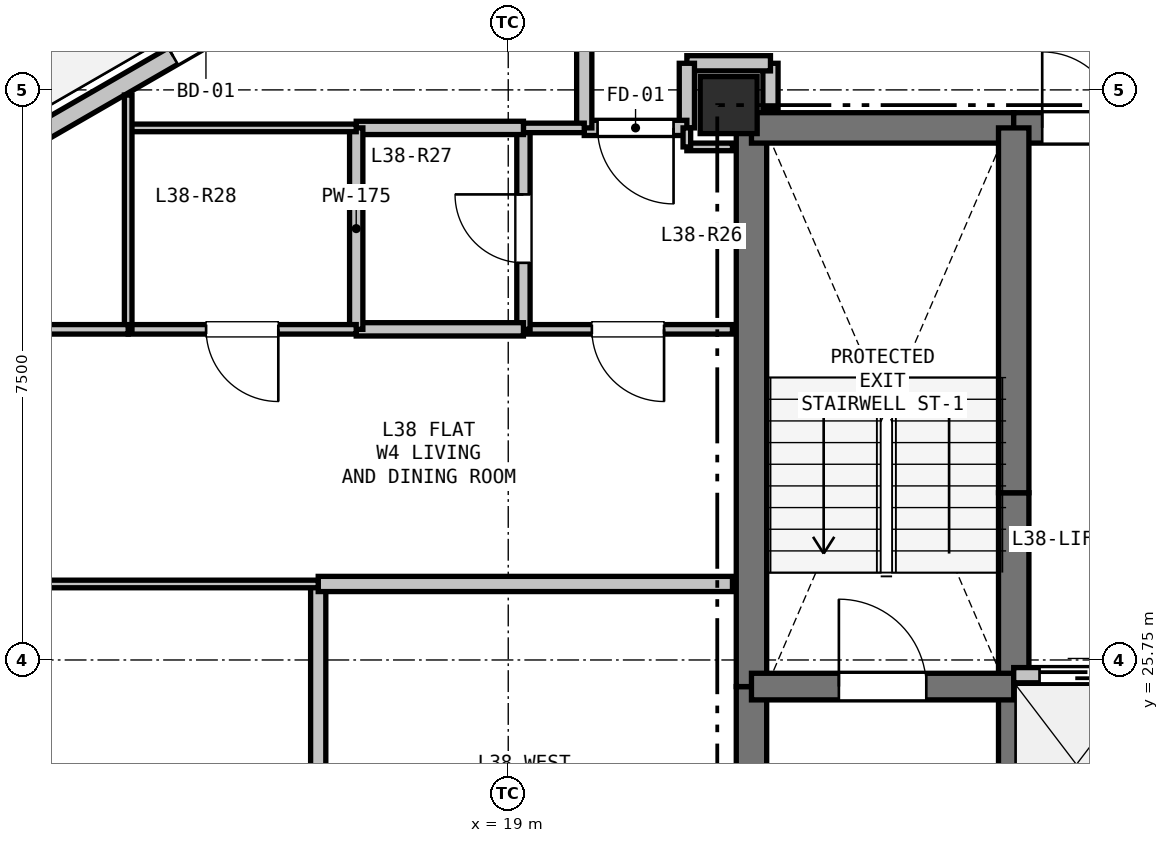
"""IFC4 building model, lengths in metres.
Left out: names, types, materials, properties, quantities, classifications, styles, units other than length and angle.
Written with IfcOpenShell. Run it as: python <this file> out.ifc"""

import sys

from ifc_helpers import new_model, si_unit, direction, frame, frame_2d, origin, origin_2d, place, context, subcontext, project, spatial, rectangle, extrude, element, fill, save


model = new_model("IFC4")
c1 = context("Model", 3, precision=1e-05, world=origin(), true_north=direction((0.0, 1.0)))
c2 = subcontext(c1, "Body", "Model", "MODEL_VIEW")
j1 = project(units=[si_unit("LENGTHUNIT", "METRE"), si_unit("PLANEANGLEUNIT", "RADIAN")], contexts=[c1])
p1 = place(None, origin())
s1 = spatial("IfcSite", under=j1, at=p1, CompositionType="ELEMENT")
p2 = place(p1, origin())
s2 = spatial("IfcBuilding", under=s1, at=p2, CompositionType="ELEMENT")
p3 = place(p2, frame((0.0, 0.0, 137.7)))
s3 = spatial("IfcBuildingStorey", under=s2, at=p3, CompositionType="ELEMENT", Elevation=137.7)
p4 = place(p3, frame((21.9, 33.05, 0.0), z_axis=(0.0, 0.0, 1.0), x_axis=(1.0, 0.0, 0.0)))
e1 = element("IfcColumn", 1, at=p4, inside=s3, PredefinedType="COLUMN", context=c2, shape_type="SweptSolid", body=[
    extrude(rectangle(XDim=0.75, YDim=0.75, at=origin_2d()), origin(), (0.0, 0.0, 1.0), 3.3),
])
p5 = place(p3, frame((6.69, 29.134, 0.0), z_axis=(0.0, 0.0, 1.0), x_axis=(0.866027848477, 0.499995765644, 0.0)))
e2 = element("IfcWall", 2, at=p5, inside=s3, PredefinedType="SOLIDWALL", context=c2, shape_type="SweptSolid", body=[
    extrude(rectangle(XDim=11.186, YDim=0.25, at=frame_2d((5.593, 0.0))), origin(), (0.0, 0.0, 1.0), 2.68),
])
p6 = place(p5, frame((9.122, 0.0, 0.0)))
e3 = element("IfcOpeningElement", 3, at=p6, cuts=e2, PredefinedType="OPENING", context=c2, shape_type="SweptSolid", body=[
    extrude(rectangle(XDim=1.0, YDim=2.1, at=frame_2d((0.5, 1.05))), frame((0.0, 0.135, 0.0), z_axis=(0.0, -1.0, 0.0), x_axis=(1.0, 0.0, 0.0)), (0.0, 0.0, 1.0), 0.27),
])
p7 = place(p3, frame((16.378, 18.773, 0.0), z_axis=(0.0, 0.0, 1.0), x_axis=(-0.866027848477, 0.499995765644, 0.0)))
e4 = element("IfcWall", 4, at=p7, inside=s3, PredefinedType="SOLIDWALL", context=c2, shape_type="SweptSolid", body=[
    extrude(rectangle(XDim=11.186, YDim=0.25, at=frame_2d((5.593, 0.0))), origin(), (0.0, 0.0, 1.0), 2.68),
])
p8 = place(p7, frame((6.605, 0.0, 0.9)))
e5 = element("IfcOpeningElement", 5, at=p8, cuts=e4, PredefinedType="OPENING", context=c2, shape_type="SweptSolid", body=[
    extrude(rectangle(XDim=1.2, YDim=1.4, at=frame_2d((0.6, 0.7))), frame((0.0, 0.135, 0.0), z_axis=(0.0, -1.0, 0.0), x_axis=(1.0, 0.0, 0.0)), (0.0, 0.0, 1.0), 0.27),
])
p9 = place(p3, frame((22.2, 20.75, 0.0), z_axis=(0.0, 0.0, 1.0), x_axis=(0.0, 1.0, 0.0)))
e6 = element("IfcWall", 6, at=p9, inside=s3, PredefinedType="SHEAR", context=c2, shape_type="SweptSolid", body=[
    extrude(rectangle(XDim=4.65, YDim=0.4, at=frame_2d((2.325, 0.0))), origin(), (0.0, 0.0, 1.0), 3.06),
])
p10 = place(p3, frame((22.2, 25.4, 0.0), z_axis=(0.0, 0.0, 1.0), x_axis=(0.0, 1.0, 0.0)))
e7 = element("IfcWall", 7, at=p10, inside=s3, PredefinedType="SHEAR", context=c2, shape_type="SweptSolid", body=[
    extrude(rectangle(XDim=7.35, YDim=0.4, at=frame_2d((3.675, 0.0))), origin(), (0.0, 0.0, 1.0), 3.06),
])
p11 = place(p3, frame((22.2, 32.75, 0.0), z_axis=(0.0, 0.0, 1.0), x_axis=(1.0, 0.0, 0.0)))
e8 = element("IfcWall", 8, at=p11, inside=s3, PredefinedType="SHEAR", context=c2, shape_type="SweptSolid", body=[
    extrude(rectangle(XDim=3.45, YDim=0.4, at=frame_2d((1.725, 0.0))), origin(), (0.0, 0.0, 1.0), 3.06),
])
p12 = place(p3, frame((25.65, 32.75, 0.0), z_axis=(0.0, 0.0, 1.0), x_axis=(1.0, 0.0, 0.0)))
e9 = element("IfcWall", 9, at=p12, inside=s3, PredefinedType="SHEAR", context=c2, shape_type="SweptSolid", body=[
    extrude(rectangle(XDim=1.75, YDim=0.4, at=frame_2d((0.875, 0.0))), origin(), (0.0, 0.0, 1.0), 3.06),
])
p13 = place(p12, frame((0.375, 0.0, 0.0)))
e10 = element("IfcOpeningElement", 10, at=p13, cuts=e9, PredefinedType="OPENING", context=c2, shape_type="SweptSolid", body=[
    extrude(rectangle(XDim=1.0, YDim=2.15, at=frame_2d((0.5, 1.075))), frame((0.0, 0.21, 0.0), z_axis=(0.0, -1.0, 0.0), x_axis=(1.0, 0.0, 0.0)), (0.0, 0.0, 1.0), 0.42),
])
p14 = place(p3, frame((25.65, 22.75, 0.0), z_axis=(0.0, 0.0, 1.0), x_axis=(0.0, 1.0, 0.0)))
e11 = element("IfcWall", 11, at=p14, inside=s3, PredefinedType="SHEAR", context=c2, shape_type="SweptSolid", body=[
    extrude(rectangle(XDim=2.8, YDim=0.4, at=frame_2d((1.4, 0.0))), origin(), (0.0, 0.0, 1.0), 3.06),
])
p15 = place(p3, frame((25.65, 25.55, 0.0), z_axis=(0.0, 0.0, 1.0), x_axis=(0.0, 1.0, 0.0)))
e12 = element("IfcWall", 12, at=p15, inside=s3, PredefinedType="SHEAR", context=c2, shape_type="SweptSolid", body=[
    extrude(rectangle(XDim=2.4, YDim=0.4, at=frame_2d((1.2, 0.0))), origin(), (0.0, 0.0, 1.0), 3.06),
])
p16 = place(p3, frame((25.65, 27.95, 0.0), z_axis=(0.0, 0.0, 1.0), x_axis=(0.0, 1.0, 0.0)))
e13 = element("IfcWall", 13, at=p16, inside=s3, PredefinedType="SHEAR", context=c2, shape_type="SweptSolid", body=[
    extrude(rectangle(XDim=4.8, YDim=0.4, at=frame_2d((2.4, 0.0))), origin(), (0.0, 0.0, 1.0), 3.06),
])
p17 = place(p3, frame((22.2, 25.4, 0.0), z_axis=(0.0, 0.0, 1.0), x_axis=(1.0, 0.0, 0.0)))
e14 = element("IfcWall", 14, at=p17, inside=s3, PredefinedType="SHEAR", context=c2, shape_type="SweptSolid", body=[
    extrude(rectangle(XDim=3.45, YDim=0.35, at=frame_2d((1.725, 0.0))), origin(), (0.0, 0.0, 1.0), 3.06),
])
p18 = place(p17, frame((1.15, 0.0, 0.0)))
e15 = element("IfcOpeningElement", 15, at=p18, cuts=e14, PredefinedType="OPENING", context=c2, shape_type="SweptSolid", body=[
    extrude(rectangle(XDim=1.15, YDim=2.15, at=frame_2d((0.575, 1.075))), frame((0.0, 0.185, 0.0), z_axis=(0.0, -1.0, 0.0), x_axis=(1.0, 0.0, 0.0)), (0.0, 0.0, 1.0), 0.37),
])
p19 = place(p3, frame((25.65, 25.55, 0.0), z_axis=(0.0, 0.0, 1.0), x_axis=(1.0, 0.0, 0.0)))
e16 = element("IfcWall", 16, at=p19, inside=s3, PredefinedType="PARTITIONING", context=c2, shape_type="SweptSolid", body=[
    extrude(rectangle(XDim=4.95, YDim=0.2, at=frame_2d((2.475, 0.0))), origin(), (0.0, 0.0, 1.0), 3.06),
])
p20 = place(p19, frame((0.34, 0.0, 0.0)))
e17 = element("IfcOpeningElement", 17, at=p20, cuts=e16, PredefinedType="OPENING", context=c2, shape_type="SweptSolid", body=[
    extrude(rectangle(XDim=1.1, YDim=2.15, at=frame_2d((0.55, 1.075))), frame((0.0, 0.11, 0.0), z_axis=(0.0, -1.0, 0.0), x_axis=(1.0, 0.0, 0.0)), (0.0, 0.0, 1.0), 0.22),
])
p21 = place(p19, frame((1.99, 0.0, 0.0)))
e18 = element("IfcOpeningElement", 18, at=p21, cuts=e16, PredefinedType="OPENING", context=c2, shape_type="SweptSolid", body=[
    extrude(rectangle(XDim=1.1, YDim=2.15, at=frame_2d((0.55, 1.075))), frame((0.0, 0.11, 0.0), z_axis=(0.0, -1.0, 0.0), x_axis=(1.0, 0.0, 0.0)), (0.0, 0.0, 1.0), 0.22),
])
p22 = place(p19, frame((3.64, 0.0, 0.0)))
e19 = element("IfcOpeningElement", 19, at=p22, cuts=e16, PredefinedType="OPENING", context=c2, shape_type="SweptSolid", body=[
    extrude(rectangle(XDim=1.1, YDim=2.15, at=frame_2d((0.55, 1.075))), frame((0.0, 0.11, 0.0), z_axis=(0.0, -1.0, 0.0), x_axis=(1.0, 0.0, 0.0)), (0.0, 0.0, 1.0), 0.22),
])
p23 = place(p3, frame((22.45, 33.0, 0.0), z_axis=(0.0, 0.0, 1.0), x_axis=(0.0, 1.0, 0.0)))
e20 = element("IfcWall", 20, at=p23, inside=s3, PredefinedType="PARTITIONING", context=c2, shape_type="SweptSolid", body=[
    extrude(rectangle(XDim=0.6, YDim=0.2, at=frame_2d((0.3, 0.0))), origin(), (0.0, 0.0, 1.0), 2.508),
])
p24 = place(p3, frame((22.45, 33.6, 0.0), z_axis=(0.0, 0.0, 1.0), x_axis=(-1.0, 0.0, 0.0)))
e21 = element("IfcWall", 21, at=p24, inside=s3, PredefinedType="PARTITIONING", context=c2, shape_type="SweptSolid", body=[
    extrude(rectangle(XDim=1.1, YDim=0.2, at=frame_2d((0.55, 0.0))), origin(), (0.0, 0.0, 1.0), 3.06),
])
p25 = place(p3, frame((21.35, 33.6, 0.0), z_axis=(0.0, 0.0, 1.0), x_axis=(0.0, -1.0, 0.0)))
e22 = element("IfcWall", 22, at=p25, inside=s3, PredefinedType="PARTITIONING", context=c2, shape_type="SweptSolid", body=[
    extrude(rectangle(XDim=0.85, YDim=0.2, at=frame_2d((0.425, 0.0))), origin(), (0.0, 0.0, 1.0), 2.433),
])
p26 = place(p3, frame((21.35, 32.75, 0.0), z_axis=(0.0, 0.0, 1.0), x_axis=(-1.0, 0.0, 0.0)))
e23 = element("IfcWall", 23, at=p26, inside=s3, PredefinedType="PARTITIONING", context=c2, shape_type="SweptSolid", body=[
    extrude(rectangle(XDim=1.35, YDim=0.2, at=frame_2d((0.675, 0.0))), origin(), (0.0, 0.0, 1.0), 2.433),
])
p27 = place(p26, frame((0.175, 0.0, 0.0)))
e24 = element("IfcOpeningElement", 24, at=p27, cuts=e23, PredefinedType="OPENING", context=c2, shape_type="SweptSolid", body=[
    extrude(rectangle(XDim=1.0, YDim=2.15, at=frame_2d((0.5, 1.075))), frame((0.0, 0.11, 0.0), z_axis=(0.0, -1.0, 0.0), x_axis=(1.0, 0.0, 0.0)), (0.0, 0.0, 1.0), 0.22),
])
p28 = place(p3, frame((20.0, 32.75, 0.0), z_axis=(0.0, 0.0, 1.0), x_axis=(0.0, 1.0, 0.0)))
e25 = element("IfcWall", 25, at=p28, inside=s3, PredefinedType="PARTITIONING", context=c2, shape_type="SweptSolid", body=[
    extrude(rectangle(XDim=2.6, YDim=0.2, at=frame_2d((1.3, 0.0))), origin(), (0.0, 0.0, 1.0), 2.433),
])
p29 = place(p3, frame((21.35, 32.5, 0.0), z_axis=(0.0, 0.0, 1.0), x_axis=(1.0, 0.0, 0.0)))
e26 = element("IfcWall", 26, at=p29, inside=s3, PredefinedType="PARTITIONING", context=c2, shape_type="SweptSolid", body=[
    extrude(rectangle(XDim=0.6, YDim=0.1, at=frame_2d((0.3, 0.0))), origin(), (0.0, 0.0, 1.0), 2.508),
])
p30 = place(p3, frame((21.95, 30.1, 0.0), z_axis=(0.0, 0.0, 1.0), x_axis=(-1.0, 0.0, 0.0)))
e27 = element("IfcWall", 27, at=p30, inside=s3, PredefinedType="PARTITIONING", context=c2, shape_type="SweptSolid", body=[
    extrude(rectangle(XDim=2.75, YDim=0.125, at=frame_2d((1.375, 0.0))), origin(), (0.0, 0.0, 1.0), 2.508),
])
p31 = place(p30, frame((0.9, 0.0, 0.0)))
e28 = element("IfcOpeningElement", 28, at=p31, cuts=e27, PredefinedType="OPENING", context=c2, shape_type="SweptSolid", body=[
    extrude(rectangle(XDim=0.95, YDim=2.1, at=frame_2d((0.475, 1.05))), frame((0.0, 0.073, 0.0), z_axis=(0.0, -1.0, 0.0), x_axis=(1.0, 0.0, 0.0)), (0.0, 0.0, 1.0), 0.145),
])
p32 = place(p3, frame((19.2, 30.1, 0.0), z_axis=(0.0, 0.0, 1.0), x_axis=(0.0, 1.0, 0.0)))
e29 = element("IfcWall", 29, at=p32, inside=s3, PredefinedType="PLUMBINGWALL", context=c2, shape_type="SweptSolid", body=[
    extrude(rectangle(XDim=2.65, YDim=0.175, at=frame_2d((1.325, 0.0))), origin(), (0.0, 0.0, 1.0), 2.433),
])
p33 = place(p32, frame((0.875, 0.0, 0.0)))
e30 = element("IfcOpeningElement", 30, at=p33, cuts=e29, PredefinedType="OPENING", context=c2, shape_type="SweptSolid", body=[
    extrude(rectangle(XDim=0.9, YDim=2.1, at=frame_2d((0.45, 1.05))), frame((0.0, 0.097, 0.0), z_axis=(0.0, -1.0, 0.0), x_axis=(1.0, 0.0, 0.0)), (0.0, 0.0, 1.0), 0.195),
])
p34 = place(p3, frame((19.2, 32.75, 0.0), z_axis=(0.0, 0.0, 1.0), x_axis=(1.0, 0.0, 0.0)))
e31 = element("IfcWall", 31, at=p34, inside=s3, PredefinedType="PARTITIONING", context=c2, shape_type="SweptSolid", body=[
    extrude(rectangle(XDim=0.8, YDim=0.125, at=frame_2d((0.4, 0.0))), origin(), (0.0, 0.0, 1.0), 2.433),
])
p35 = place(p3, frame((21.35, 32.75, 0.0), z_axis=(0.0, 0.0, 1.0), x_axis=(0.0, -1.0, 0.0)))
e32 = element("IfcWall", 32, at=p35, inside=s3, PredefinedType="PARTITIONING", context=c2, shape_type="SweptSolid", body=[
    extrude(rectangle(XDim=0.25, YDim=0.1, at=frame_2d((0.125, 0.0))), origin(), (0.0, 0.0, 1.0), 3.06),
])
p36 = place(p3, frame((17.0, 32.75, 0.0), z_axis=(0.0, 0.0, 1.0), x_axis=(1.0, 0.0, 0.0)))
e33 = element("IfcWall", 33, at=p36, inside=s3, PredefinedType="PLUMBINGWALL", context=c2, shape_type="SweptSolid", body=[
    extrude(rectangle(XDim=2.2, YDim=0.175, at=frame_2d((1.1, 0.0))), origin(), (0.0, 0.0, 1.0), 2.433),
])
p37 = place(p3, frame((19.2, 30.1, 0.0), z_axis=(0.0, 0.0, 1.0), x_axis=(-1.0, 0.0, 0.0)))
e34 = element("IfcWall", 34, at=p37, inside=s3, PredefinedType="PLUMBINGWALL", context=c2, shape_type="SweptSolid", body=[
    extrude(rectangle(XDim=2.2, YDim=0.175, at=frame_2d((1.1, 0.0))), origin(), (0.0, 0.0, 1.0), 3.06),
])
p38 = place(p3, frame((17.0, 30.1, 0.0), z_axis=(0.0, 0.0, 1.0), x_axis=(0.0, 1.0, 0.0)))
e35 = element("IfcWall", 35, at=p38, inside=s3, PredefinedType="PLUMBINGWALL", context=c2, shape_type="SweptSolid", body=[
    extrude(rectangle(XDim=2.65, YDim=0.175, at=frame_2d((1.325, 0.0))), origin(), (0.0, 0.0, 1.0), 2.433),
])
p39 = place(p3, frame((14.0, 32.75, 0.0), z_axis=(0.0, 0.0, 1.0), x_axis=(1.0, 0.0, 0.0)))
e36 = element("IfcWall", 36, at=p39, inside=s3, PredefinedType="PARTITIONING", context=c2, shape_type="SweptSolid", body=[
    extrude(rectangle(XDim=3.0, YDim=0.1, at=frame_2d((1.5, 0.0))), origin(), (0.0, 0.0, 1.0), 2.365),
])
p40 = place(p3, frame((17.0, 30.1, 0.0), z_axis=(0.0, 0.0, 1.0), x_axis=(-1.0, 0.0, 0.0)))
e37 = element("IfcWall", 37, at=p40, inside=s3, PredefinedType="PARTITIONING", context=c2, shape_type="SweptSolid", body=[
    extrude(rectangle(XDim=3.0, YDim=0.125, at=frame_2d((1.5, 0.0))), origin(), (0.0, 0.0, 1.0), 3.06),
])
p41 = place(p40, frame((1.025, 0.0, 0.0)))
e38 = element("IfcOpeningElement", 38, at=p41, cuts=e37, PredefinedType="OPENING", context=c2, shape_type="SweptSolid", body=[
    extrude(rectangle(XDim=0.95, YDim=2.1, at=frame_2d((0.475, 1.05))), frame((0.0, 0.073, 0.0), z_axis=(0.0, -1.0, 0.0), x_axis=(1.0, 0.0, 0.0)), (0.0, 0.0, 1.0), 0.145),
])
p42 = place(p3, frame((14.0, 30.1, 0.0), z_axis=(0.0, 0.0, 1.0), x_axis=(0.0, 1.0, 0.0)))
e39 = element("IfcWall", 39, at=p42, inside=s3, PredefinedType="PARTITIONING", context=c2, shape_type="SweptSolid", body=[
    extrude(rectangle(XDim=3.082, YDim=0.1, at=frame_2d((1.541, 0.0))), origin(), (0.0, 0.0, 1.0), 2.365),
])
p43 = place(p3, frame((16.5, 20.75, 0.0), z_axis=(0.0, 0.0, 1.0), x_axis=(0.0, 1.0, 0.0)))
e40 = element("IfcWall", 40, at=p43, inside=s3, PredefinedType="PARTITIONING", context=c2, shape_type="SweptSolid", body=[
    extrude(rectangle(XDim=6.0, YDim=0.2, at=frame_2d((3.0, 0.0))), origin(), (0.0, 0.0, 1.0), 2.433),
])
p44 = place(p3, frame((16.5, 26.75, 0.0), z_axis=(0.0, 0.0, 1.0), x_axis=(1.0, 0.0, 0.0)))
e41 = element("IfcWall", 41, at=p44, inside=s3, PredefinedType="PARTITIONING", context=c2, shape_type="SweptSolid", body=[
    extrude(rectangle(XDim=5.45, YDim=0.2, at=frame_2d((2.725, 0.0))), origin(), (0.0, 0.0, 1.0), 2.508),
])
p45 = place(p3, frame((8.635, 30.1, 0.0), z_axis=(0.0, 0.0, 1.0), x_axis=(1.0, 0.0, 0.0)))
e42 = element("IfcWall", 42, at=p45, inside=s3, PredefinedType="PARTITIONING", context=c2, shape_type="SweptSolid", body=[
    extrude(rectangle(XDim=5.365, YDim=0.125, at=frame_2d((2.683, 0.0))), origin(), (0.0, 0.0, 1.0), 2.725),
])
p46 = place(p3, frame((16.5, 26.75, 0.0), z_axis=(0.0, 0.0, 1.0), x_axis=(-1.0, 0.0, 0.0)))
e43 = element("IfcWall", 43, at=p46, inside=s3, PredefinedType="PARTITIONING", context=c2, shape_type="SweptSolid", body=[
    extrude(rectangle(XDim=9.791, YDim=0.1, at=frame_2d((4.896, 0.0))), origin(), (0.0, 0.0, 1.0), 2.725),
])
p47 = place(p46, frame((4.42, 0.0, 0.0)))
e44 = element("IfcOpeningElement", 44, at=p47, cuts=e43, PredefinedType="OPENING", context=c2, shape_type="SweptSolid", body=[
    extrude(rectangle(XDim=0.95, YDim=2.1, at=frame_2d((0.475, 1.05))), frame((0.0, 0.06, 0.0), z_axis=(0.0, -1.0, 0.0), x_axis=(1.0, 0.0, 0.0)), (0.0, 0.0, 1.0), 0.12),
])
p48 = place(p6, origin())
e45 = element("IfcDoor", 45, at=p48, inside=s3, OperationType="SINGLE_SWING_LEFT", PredefinedType="DOOR", context=c2, shape_type="SweptSolid", body=[
    extrude(rectangle(XDim=1.0, YDim=2.1, at=frame_2d((0.5, 1.05))), frame((0.0, 0.025, 0.0), z_axis=(0.0, -1.0, 0.0), x_axis=(1.0, 0.0, 0.0)), (0.0, 0.0, 1.0), 0.05),
])
fill(e3, e45)
p49 = place(p20, origin())
e46 = element("IfcDoor", 46, at=p49, inside=s3, OperationType="SLIDING_TO_LEFT", PredefinedType="DOOR", context=c2, shape_type="SweptSolid", body=[
    extrude(rectangle(XDim=1.1, YDim=2.15, at=frame_2d((0.55, 1.075))), frame((0.0, 0.025, 0.0), z_axis=(0.0, -1.0, 0.0), x_axis=(1.0, 0.0, 0.0)), (0.0, 0.0, 1.0), 0.05),
])
fill(e17, e46)
p50 = place(p13, origin())
e47 = element("IfcDoor", 47, at=p50, inside=s3, OperationType="SINGLE_SWING_LEFT", PredefinedType="DOOR", context=c2, shape_type="SweptSolid", body=[
    extrude(rectangle(XDim=1.0, YDim=2.15, at=frame_2d((0.5, 1.075))), frame((0.0, 0.025, 0.0), z_axis=(0.0, -1.0, 0.0), x_axis=(1.0, 0.0, 0.0)), (0.0, 0.0, 1.0), 0.05),
])
fill(e10, e47)
p51 = place(p18, origin())
e48 = element("IfcDoor", 48, at=p51, inside=s3, OperationType="SINGLE_SWING_LEFT", PredefinedType="DOOR", context=c2, shape_type="SweptSolid", body=[
    extrude(rectangle(XDim=1.15, YDim=2.15, at=frame_2d((0.575, 1.075))), frame((0.0, 0.025, 0.0), z_axis=(0.0, -1.0, 0.0), x_axis=(1.0, 0.0, 0.0)), (0.0, 0.0, 1.0), 0.05),
])
fill(e15, e48)
p52 = place(p27, origin())
e49 = element("IfcDoor", 49, at=p52, inside=s3, OperationType="SINGLE_SWING_LEFT", PredefinedType="DOOR", context=c2, shape_type="SweptSolid", body=[
    extrude(rectangle(XDim=1.0, YDim=2.15, at=frame_2d((0.5, 1.075))), frame((0.0, 0.025, 0.0), z_axis=(0.0, -1.0, 0.0), x_axis=(1.0, 0.0, 0.0)), (0.0, 0.0, 1.0), 0.05),
])
fill(e24, e49)
p53 = place(p33, origin())
e50 = element("IfcDoor", 50, at=p53, inside=s3, OperationType="SINGLE_SWING_RIGHT", PredefinedType="DOOR", context=c2, shape_type="SweptSolid", body=[
    extrude(rectangle(XDim=0.9, YDim=2.1, at=frame_2d((0.45, 1.05))), frame((0.0, 0.025, 0.0), z_axis=(0.0, -1.0, 0.0), x_axis=(1.0, 0.0, 0.0)), (0.0, 0.0, 1.0), 0.05),
])
fill(e30, e50)
p54 = place(p31, origin())
e51 = element("IfcDoor", 51, at=p54, inside=s3, OperationType="SINGLE_SWING_LEFT", PredefinedType="DOOR", context=c2, shape_type="SweptSolid", body=[
    extrude(rectangle(XDim=0.95, YDim=2.1, at=frame_2d((0.475, 1.05))), frame((0.0, 0.025, 0.0), z_axis=(0.0, -1.0, 0.0), x_axis=(1.0, 0.0, 0.0)), (0.0, 0.0, 1.0), 0.05),
])
fill(e28, e51)
p55 = place(p41, origin())
e52 = element("IfcDoor", 52, at=p55, inside=s3, OperationType="SINGLE_SWING_LEFT", PredefinedType="DOOR", context=c2, shape_type="SweptSolid", body=[
    extrude(rectangle(XDim=0.95, YDim=2.1, at=frame_2d((0.475, 1.05))), frame((0.0, 0.025, 0.0), z_axis=(0.0, -1.0, 0.0), x_axis=(1.0, 0.0, 0.0)), (0.0, 0.0, 1.0), 0.05),
])
fill(e38, e52)
save(model, sys.argv[1])
